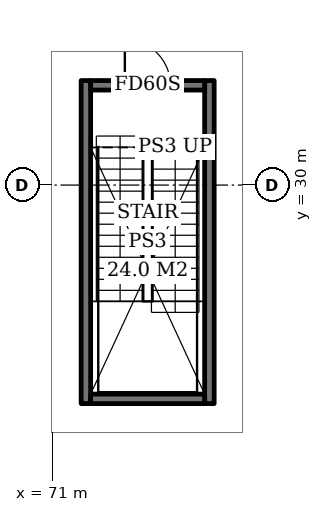
"""IFC4 building model, lengths in metres.
Left out: names, types, materials, properties, quantities, classifications, styles, units other than length and angle.
Written with IfcOpenShell. Run it as: python <this file> out.ifc"""

import sys

from ifc_helpers import new_model, si_unit, direction, frame, frame_2d, origin, place, context, subcontext, project, spatial, rectangle, extrude, element, fill, save


model = new_model("IFC4")
c1 = context("Model", 3, precision=1e-05, world=origin(), true_north=direction((0.0, 1.0)))
c2 = subcontext(c1, "Body", "Model", "MODEL_VIEW")
j1 = project(units=[si_unit("LENGTHUNIT", "METRE"), si_unit("PLANEANGLEUNIT", "RADIAN")], contexts=[c1])
p1 = place(None, origin())
s1 = spatial("IfcSite", under=j1, at=p1, CompositionType="ELEMENT")
p2 = place(p1, origin())
s2 = spatial("IfcBuilding", under=s1, at=p2, CompositionType="ELEMENT")
p3 = place(p2, frame((0.0, 0.0, 11.0)))
s3 = spatial("IfcBuildingStorey", under=s2, at=p3, CompositionType="ELEMENT", Elevation=11.0)
for number, where, z_axis, x_axis in (
    (1, (71.875, 24.25, 0.0), (0.0, 0.0, 1.0), (0.0, 1.0, 0.0)),
    (2, (75.125, 24.25, 0.0), (0.0, 0.0, 1.0), (0.0, 1.0, 0.0)),
):
    element("IfcWall", number, at=place(p3, frame(where, z_axis=z_axis, x_axis=x_axis)), inside=s3, PredefinedType="SOLIDWALL", context=c2, shape_type="SweptSolid", body=[
        extrude(rectangle(XDim=8.5, YDim=0.25, at=frame_2d((4.25, 0.0))), origin(), (0.0, 0.0, 1.0), 4.7),
    ])
p4 = place(p3, frame((72.0, 24.375, 0.0), z_axis=(0.0, 0.0, 1.0), x_axis=(1.0, 0.0, 0.0)))
e3 = element("IfcWall", 3, at=p4, inside=s3, PredefinedType="SOLIDWALL", context=c2, shape_type="SweptSolid", body=[
    extrude(rectangle(XDim=3.0, YDim=0.25, at=frame_2d((1.5, 0.0))), origin(), (0.0, 0.0, 1.0), 4.7),
])
p5 = place(p3, frame((72.0, 32.625, 0.0), z_axis=(0.0, 0.0, 1.0), x_axis=(1.0, 0.0, 0.0)))
e4 = element("IfcWall", 4, at=p5, inside=s3, PredefinedType="SOLIDWALL", context=c2, shape_type="SweptSolid", body=[
    extrude(rectangle(XDim=3.0, YDim=0.25, at=frame_2d((1.5, 0.0))), origin(), (0.0, 0.0, 1.0), 4.7),
])
p6 = place(p5, frame((0.9, 0.0, 0.0)))
e5 = element("IfcOpeningElement", 5, at=p6, cuts=e4, PredefinedType="OPENING", context=c2, shape_type="SweptSolid", body=[
    extrude(rectangle(XDim=1.2, YDim=2.1, at=frame_2d((0.6, 1.05))), frame((0.0, 0.135, 0.0), z_axis=(0.0, -1.0, 0.0), x_axis=(1.0, 0.0, 0.0)), (0.0, 0.0, 1.0), 0.27),
])
p7 = place(p6, origin())
e6 = element("IfcDoor", 6, at=p7, inside=s3, OperationType="SINGLE_SWING_LEFT", PredefinedType="DOOR", context=c2, shape_type="SweptSolid", body=[
    extrude(rectangle(XDim=1.2, YDim=2.1, at=frame_2d((0.6, 1.05))), frame((0.0, 0.025, 0.0), z_axis=(0.0, -1.0, 0.0), x_axis=(1.0, 0.0, 0.0)), (0.0, 0.0, 1.0), 0.05),
])
fill(e5, e6)
save(model, sys.argv[1])
